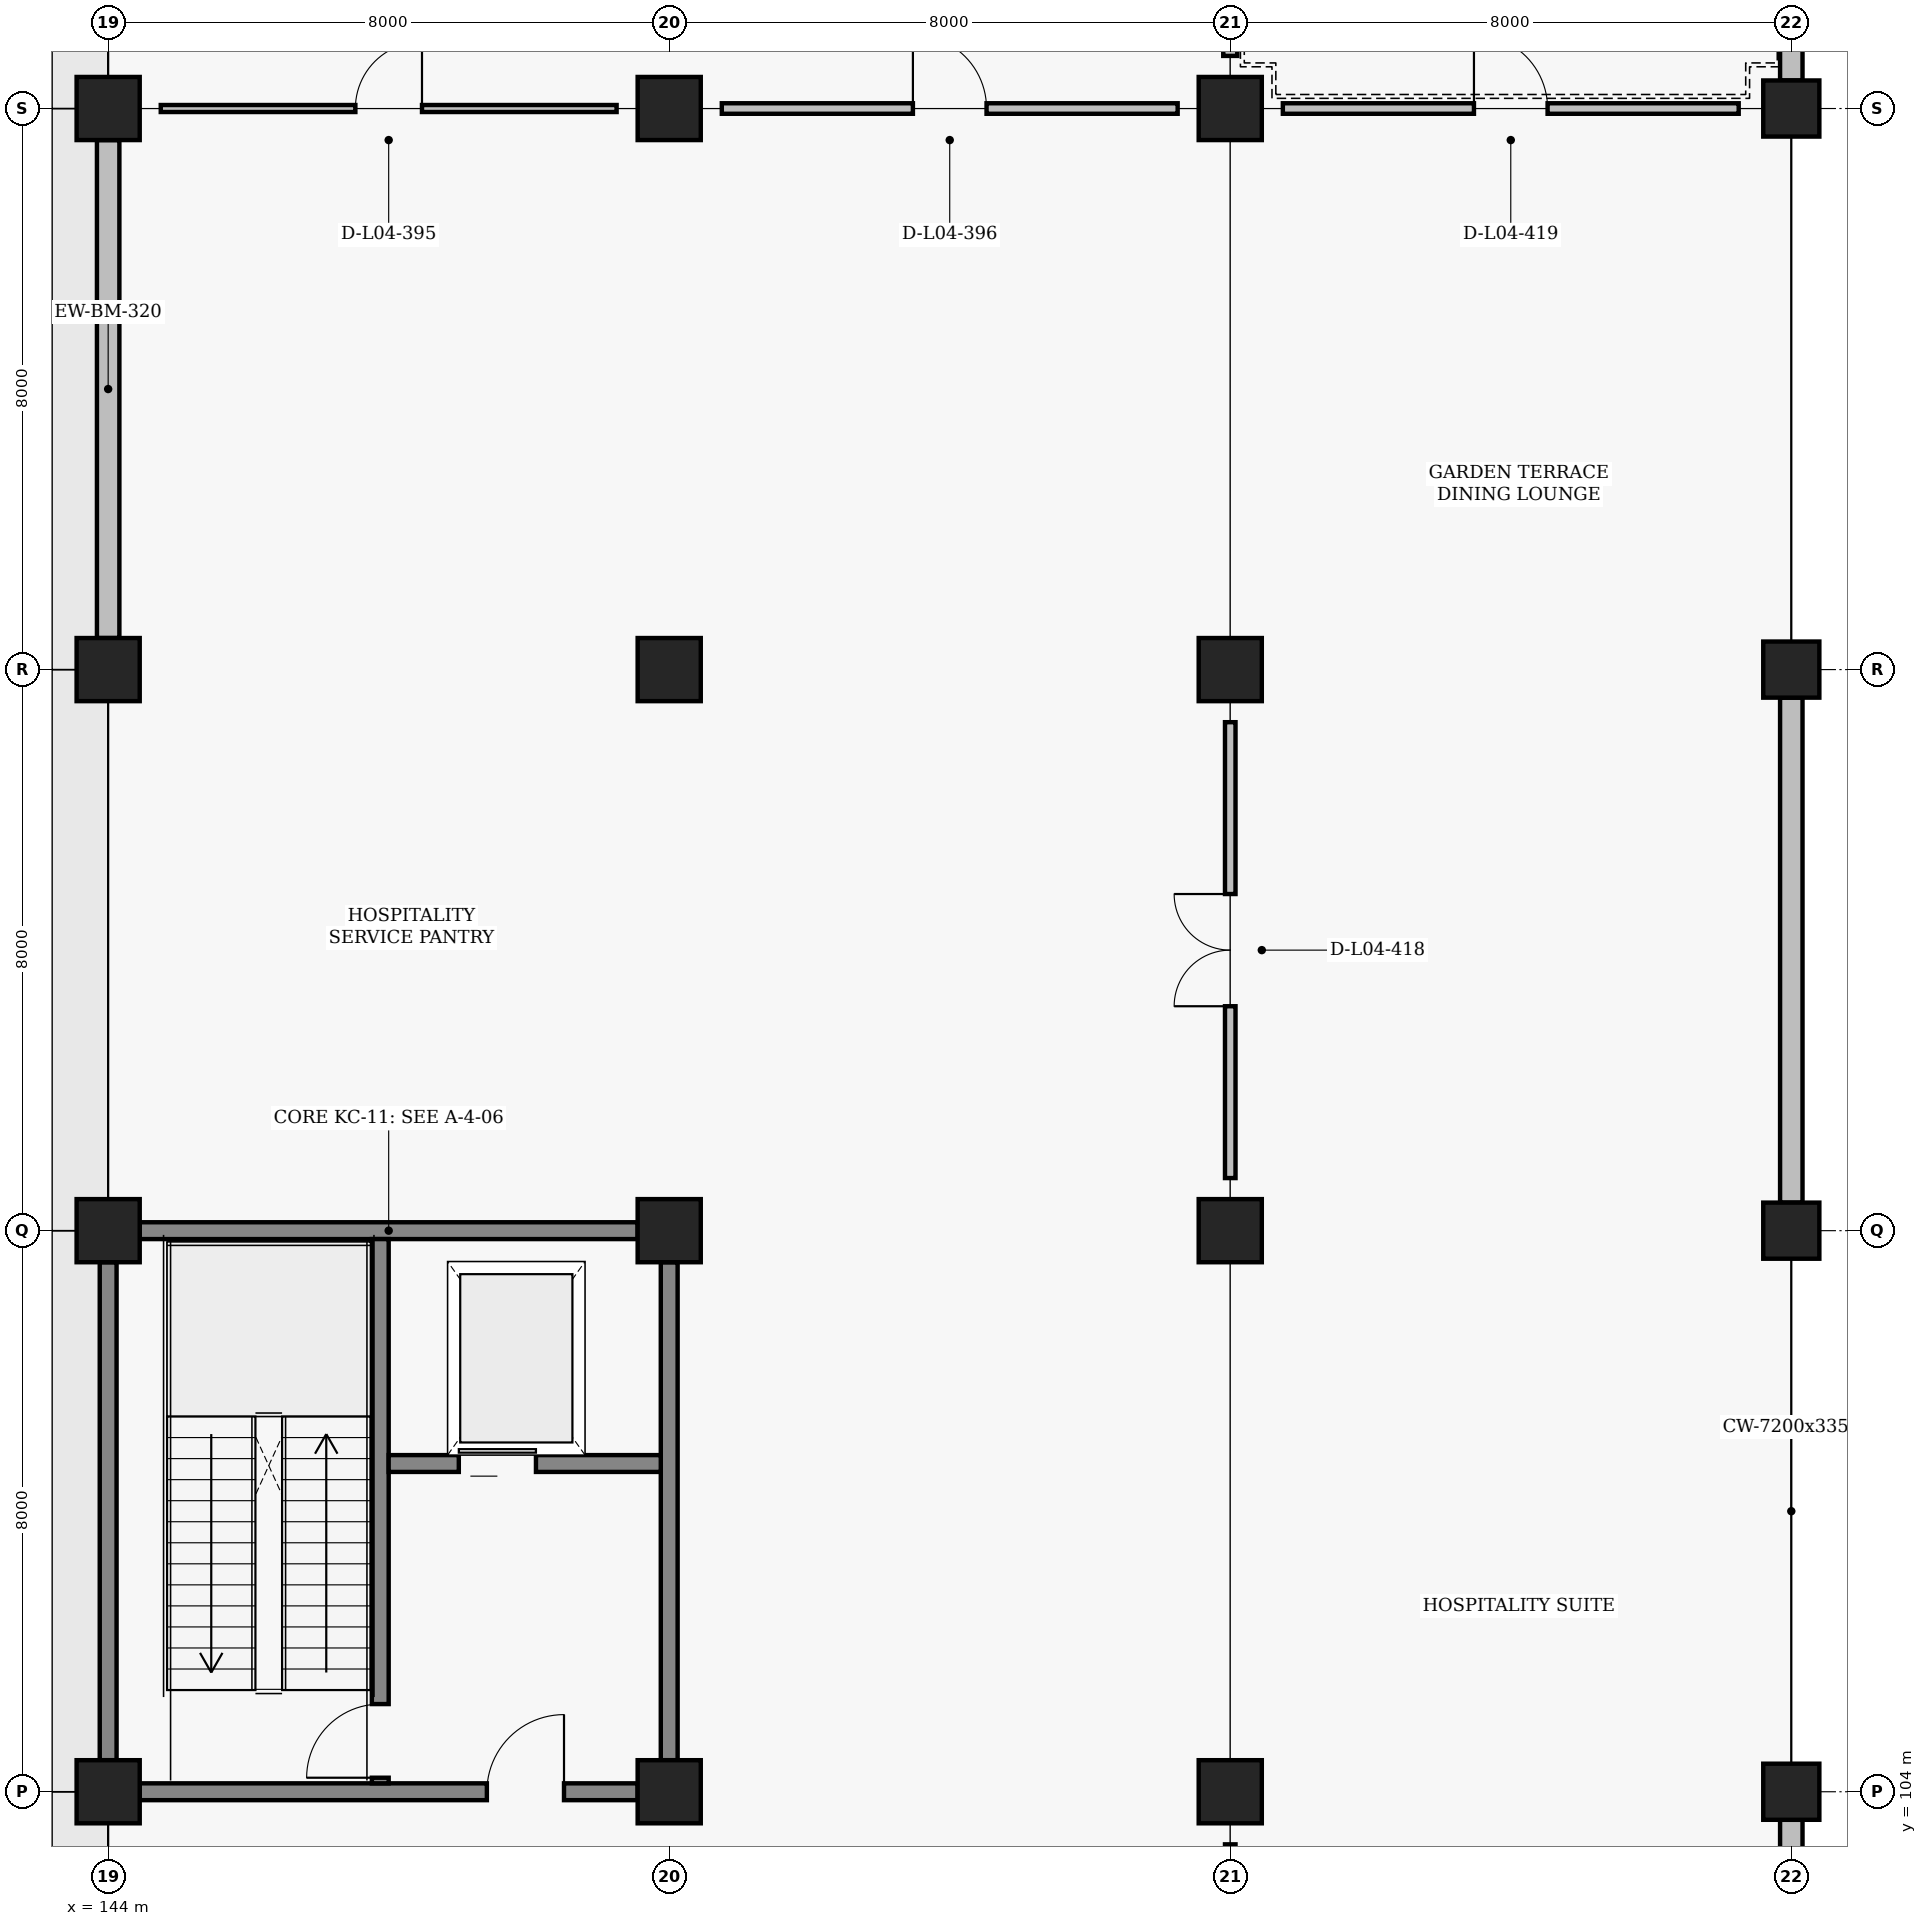
"""IFC4 building model, lengths in metres.
Left out: names, types, materials, properties, quantities, classifications, styles, units other than length and angle.
Written with IfcOpenShell. Run it as: python <this file> out.ifc"""

import sys

from ifc_helpers import new_model, si_unit, direction, frame, frame_2d, origin, origin_2d, place, context, subcontext, project, spatial, rectangle, extrude, element, fill, save


model = new_model("IFC4")
c1 = context("Model", 3, precision=1e-05, world=origin(), true_north=direction((0.0, 1.0)))
c2 = subcontext(c1, "Body", "Model", "MODEL_VIEW")
j1 = project(units=[si_unit("LENGTHUNIT", "METRE"), si_unit("PLANEANGLEUNIT", "RADIAN")], contexts=[c1])
p1 = place(None, origin())
s1 = spatial("IfcSite", under=j1, at=p1, CompositionType="ELEMENT")
p2 = place(p1, origin())
s2 = spatial("IfcBuilding", under=s1, at=p2, CompositionType="ELEMENT")
p3 = place(p2, frame((0.0, 0.0, 14.4)))
s3 = spatial("IfcBuildingStorey", under=s2, at=p3, CompositionType="ELEMENT", Elevation=14.4)
for number, where, z_axis, x_axis in (
    (1, (144.0, 104.0, 0.0), (0.0, 0.0, 1.0), (1.0, 0.0, 0.0)),
    (2, (144.0, 112.0, 0.0), (0.0, 0.0, 1.0), (1.0, 0.0, 0.0)),
    (3, (144.0, 120.0, 0.0), (0.0, 0.0, 1.0), (1.0, 0.0, 0.0)),
    (4, (144.0, 128.0, 0.0), (0.0, 0.0, 1.0), (1.0, 0.0, 0.0)),
    (5, (152.0, 104.0, 0.0), (0.0, 0.0, 1.0), (1.0, 0.0, 0.0)),
    (6, (152.0, 112.0, 0.0), (0.0, 0.0, 1.0), (1.0, 0.0, 0.0)),
    (7, (152.0, 120.0, 0.0), (0.0, 0.0, 1.0), (1.0, 0.0, 0.0)),
    (8, (152.0, 128.0, 0.0), (0.0, 0.0, 1.0), (1.0, 0.0, 0.0)),
    (9, (160.0, 104.0, 0.0), (0.0, 0.0, 1.0), (1.0, 0.0, 0.0)),
    (10, (160.0, 112.0, 0.0), (0.0, 0.0, 1.0), (1.0, 0.0, 0.0)),
    (11, (160.0, 120.0, 0.0), (0.0, 0.0, 1.0), (1.0, 0.0, 0.0)),
    (12, (160.0, 128.0, 0.0), (0.0, 0.0, 1.0), (1.0, 0.0, 0.0)),
):
    element("IfcColumn", number, at=place(p3, frame(where, z_axis=z_axis, x_axis=x_axis)), inside=s3, PredefinedType="COLUMN", context=c2, shape_type="SweptSolid", body=[
        extrude(rectangle(XDim=0.9, YDim=0.9, at=origin_2d()), origin(), (0.0, 0.0, 1.0), 4.2),
    ])
for number, where, z_axis, x_axis in (
    (13, (168.0, 104.0, 0.0), (0.0, 0.0, 1.0), (1.0, 0.0, 0.0)),
    (14, (168.0, 112.0, 0.0), (0.0, 0.0, 1.0), (1.0, 0.0, 0.0)),
    (15, (168.0, 120.0, 0.0), (0.0, 0.0, 1.0), (1.0, 0.0, 0.0)),
    (16, (168.0, 128.0, 0.0), (0.0, 0.0, 1.0), (1.0, 0.0, 0.0)),
):
    element("IfcColumn", number, at=place(p3, frame(where, z_axis=z_axis, x_axis=x_axis)), inside=s3, PredefinedType="COLUMN", context=c2, shape_type="SweptSolid", body=[
        extrude(rectangle(XDim=0.8, YDim=0.8, at=origin_2d()), origin(), (0.0, 0.0, 1.0), 4.2),
    ])
p4 = place(p3, frame((144.0, 120.45, 0.0), z_axis=(0.0, 0.0, 1.0), x_axis=(0.0, 1.0, 0.0)))
e17 = element("IfcWall", 17, at=p4, inside=s3, PredefinedType="SOLIDWALL", context=c2, shape_type="SweptSolid", body=[
    extrude(rectangle(XDim=7.1, YDim=0.32, at=frame_2d((3.55, 0.0))), origin(), (0.0, 0.0, 1.0), 3.1),
])
for number, where, z_axis, x_axis in (
    (18, (168.0, 96.4, 0.0), (0.0, 0.0, 1.0), (0.0, 1.0, 0.0)),
    (19, (168.0, 112.4, 0.0), (0.0, 0.0, 1.0), (0.0, 1.0, 0.0)),
    (20, (168.0, 128.4, 0.0), (0.0, 0.0, 1.0), (0.0, 1.0, 0.0)),
):
    element("IfcWall", number, at=place(p3, frame(where, z_axis=z_axis, x_axis=x_axis)), inside=s3, PredefinedType="SOLIDWALL", context=c2, shape_type="SweptSolid", body=[
        extrude(rectangle(XDim=7.2, YDim=0.32, at=frame_2d((3.6, 0.0))), origin(), (0.0, 0.0, 1.0), 3.35),
    ])
p5 = place(p3, frame((144.45, 104.0, 0.0), z_axis=(0.0, 0.0, 1.0), x_axis=(1.0, 0.0, 0.0)))
e21 = element("IfcWall", 21, at=p5, inside=s3, PredefinedType="SHEAR", context=c2, shape_type="SweptSolid", body=[
    extrude(rectangle(XDim=7.1, YDim=0.24, at=frame_2d((3.55, 0.0))), origin(), (0.0, 0.0, 1.0), 3.33),
])
p6 = place(p5, frame((4.95, 0.0, 0.0)))
e22 = element("IfcOpeningElement", 22, at=p6, cuts=e21, PredefinedType="OPENING", context=c2, shape_type="SweptSolid", body=[
    extrude(rectangle(XDim=1.1, YDim=2.2, at=frame_2d((0.55, 1.1))), frame((0.0, 0.13, 0.0), z_axis=(0.0, -1.0, 0.0), x_axis=(1.0, 0.0, 0.0)), (0.0, 0.0, 1.0), 0.26),
])
p7 = place(p3, frame((144.45, 112.0, 0.0), z_axis=(0.0, 0.0, 1.0), x_axis=(1.0, 0.0, 0.0)))
e23 = element("IfcWall", 23, at=p7, inside=s3, PredefinedType="SHEAR", context=c2, shape_type="SweptSolid", body=[
    extrude(rectangle(XDim=7.1, YDim=0.24, at=frame_2d((3.55, 0.0))), origin(), (0.0, 0.0, 1.0), 3.33),
])
p8 = place(p3, frame((144.0, 104.45, 0.0), z_axis=(0.0, 0.0, 1.0), x_axis=(0.0, 1.0, 0.0)))
e24 = element("IfcWall", 24, at=p8, inside=s3, PredefinedType="SHEAR", context=c2, shape_type="SweptSolid", body=[
    extrude(rectangle(XDim=7.1, YDim=0.24, at=frame_2d((3.55, 0.0))), origin(), (0.0, 0.0, 1.0), 3.1),
])
p9 = place(p3, frame((152.0, 104.45, 0.0), z_axis=(0.0, 0.0, 1.0), x_axis=(0.0, 1.0, 0.0)))
e25 = element("IfcWall", 25, at=p9, inside=s3, PredefinedType="SHEAR", context=c2, shape_type="SweptSolid", body=[
    extrude(rectangle(XDim=7.1, YDim=0.24, at=frame_2d((3.55, 0.0))), origin(), (0.0, 0.0, 1.0), 3.33),
])
p10 = place(p3, frame((147.88, 104.12, 0.0), z_axis=(0.0, 0.0, 1.0), x_axis=(0.0, 1.0, 0.0)))
e26 = element("IfcWall", 26, at=p10, inside=s3, PredefinedType="SHEAR", context=c2, shape_type="SweptSolid", body=[
    extrude(rectangle(XDim=7.76, YDim=0.24, at=frame_2d((3.88, 0.0))), origin(), (0.0, 0.0, 1.0), 3.43),
])
p11 = place(p10, frame((0.08, 0.0, 0.0)))
e27 = element("IfcOpeningElement", 27, at=p11, cuts=e26, PredefinedType="OPENING", context=c2, shape_type="SweptSolid", body=[
    extrude(rectangle(XDim=1.05, YDim=2.15, at=frame_2d((0.525, 1.075))), frame((0.0, 0.13, 0.0), z_axis=(0.0, -1.0, 0.0), x_axis=(1.0, 0.0, 0.0)), (0.0, 0.0, 1.0), 0.26),
])
p12 = place(p3, frame((148.0, 108.68, 0.0), z_axis=(0.0, 0.0, 1.0), x_axis=(1.0, 0.0, 0.0)))
e28 = element("IfcWall", 28, at=p12, inside=s3, PredefinedType="SHEAR", context=c2, shape_type="SweptSolid", body=[
    extrude(rectangle(XDim=3.88, YDim=0.24, at=frame_2d((1.94, 0.0))), origin(), (0.0, 0.0, 1.0), 3.33),
])
p13 = place(p12, frame((1.0, 0.0, 0.0)))
e29 = element("IfcOpeningElement", 29, at=p13, cuts=e28, PredefinedType="OPENING", context=c2, shape_type="SweptSolid", body=[
    extrude(rectangle(XDim=1.1, YDim=2.15, at=frame_2d((0.55, 1.075))), frame((0.0, 0.13, 0.0), z_axis=(0.0, -1.0, 0.0), x_axis=(1.0, 0.0, 0.0)), (0.0, 0.0, 1.0), 0.26),
])
p14 = place(p3, frame((160.0, 128.75, 0.0), z_axis=(0.0, 0.0, 1.0), x_axis=(0.0, 1.0, 0.0)))
e30 = element("IfcWall", 30, at=p14, inside=s3, PredefinedType="PARTITIONING", context=c2, shape_type="SweptSolid", body=[
    extrude(rectangle(XDim=6.5, YDim=0.2, at=frame_2d((3.25, 0.0))), origin(), (0.0, 0.0, 1.0), 3.33),
])
p15 = place(p3, frame((160.0, 96.75, 0.0), z_axis=(0.0, 0.0, 1.0), x_axis=(0.0, 1.0, 0.0)))
e31 = element("IfcWall", 31, at=p15, inside=s3, PredefinedType="PARTITIONING", context=c2, shape_type="SweptSolid", body=[
    extrude(rectangle(XDim=6.5, YDim=0.15, at=frame_2d((3.25, 0.0))), origin(), (0.0, 0.0, 1.0), 3.33),
])
p16 = place(p15, frame((2.45, 0.0, 0.0)))
e32 = element("IfcOpeningElement", 32, at=p16, cuts=e31, PredefinedType="OPENING", context=c2, shape_type="SweptSolid", body=[
    extrude(rectangle(XDim=1.6, YDim=2.2, at=frame_2d((0.8, 1.1))), frame((0.0, 0.085, 0.0), z_axis=(0.0, -1.0, 0.0), x_axis=(1.0, 0.0, 0.0)), (0.0, 0.0, 1.0), 0.17),
])
p17 = place(p3, frame((144.75, 128.0, 0.0), z_axis=(0.0, 0.0, 1.0), x_axis=(1.0, 0.0, 0.0)))
e33 = element("IfcWall", 33, at=p17, inside=s3, PredefinedType="PARTITIONING", context=c2, shape_type="SweptSolid", body=[
    extrude(rectangle(XDim=6.5, YDim=0.1, at=frame_2d((3.25, 0.0))), origin(), (0.0, 0.0, 1.0), 3.43),
])
p18 = place(p17, frame((2.775, 0.0, 0.0)))
e34 = element("IfcOpeningElement", 34, at=p18, cuts=e33, PredefinedType="OPENING", context=c2, shape_type="SweptSolid", body=[
    extrude(rectangle(XDim=0.95, YDim=2.1, at=frame_2d((0.475, 1.05))), frame((0.0, 0.06, 0.0), z_axis=(0.0, -1.0, 0.0), x_axis=(1.0, 0.0, 0.0)), (0.0, 0.0, 1.0), 0.12),
])
p19 = place(p3, frame((152.75, 128.0, 0.0), z_axis=(0.0, 0.0, 1.0), x_axis=(1.0, 0.0, 0.0)))
e35 = element("IfcWall", 35, at=p19, inside=s3, PredefinedType="PARTITIONING", context=c2, shape_type="SweptSolid", body=[
    extrude(rectangle(XDim=6.5, YDim=0.15, at=frame_2d((3.25, 0.0))), origin(), (0.0, 0.0, 1.0), 3.43),
])
p20 = place(p19, frame((2.725, 0.0, 0.0)))
e36 = element("IfcOpeningElement", 36, at=p20, cuts=e35, PredefinedType="OPENING", context=c2, shape_type="SweptSolid", body=[
    extrude(rectangle(XDim=1.05, YDim=2.15, at=frame_2d((0.525, 1.075))), frame((0.0, 0.085, 0.0), z_axis=(0.0, -1.0, 0.0), x_axis=(1.0, 0.0, 0.0)), (0.0, 0.0, 1.0), 0.17),
])
p21 = place(p3, frame((160.0, 112.75, 0.0), z_axis=(0.0, 0.0, 1.0), x_axis=(0.0, 1.0, 0.0)))
e37 = element("IfcWall", 37, at=p21, inside=s3, PredefinedType="PARTITIONING", context=c2, shape_type="SweptSolid", body=[
    extrude(rectangle(XDim=6.5, YDim=0.15, at=frame_2d((3.25, 0.0))), origin(), (0.0, 0.0, 1.0), 3.33),
])
p22 = place(p21, frame((2.45, 0.0, 0.0)))
e38 = element("IfcOpeningElement", 38, at=p22, cuts=e37, PredefinedType="OPENING", context=c2, shape_type="SweptSolid", body=[
    extrude(rectangle(XDim=1.6, YDim=2.2, at=frame_2d((0.8, 1.1))), frame((0.0, 0.085, 0.0), z_axis=(0.0, -1.0, 0.0), x_axis=(1.0, 0.0, 0.0)), (0.0, 0.0, 1.0), 0.17),
])
p23 = place(p3, frame((160.75, 128.0, 0.0), z_axis=(0.0, 0.0, 1.0), x_axis=(1.0, 0.0, 0.0)))
e39 = element("IfcWall", 39, at=p23, inside=s3, PredefinedType="PARTITIONING", context=c2, shape_type="SweptSolid", body=[
    extrude(rectangle(XDim=6.5, YDim=0.15, at=frame_2d((3.25, 0.0))), origin(), (0.0, 0.0, 1.0), 3.47),
])
p24 = place(p23, frame((2.725, 0.0, 0.0)))
e40 = element("IfcOpeningElement", 40, at=p24, cuts=e39, PredefinedType="OPENING", context=c2, shape_type="SweptSolid", body=[
    extrude(rectangle(XDim=1.05, YDim=2.15, at=frame_2d((0.525, 1.075))), frame((0.0, 0.085, 0.0), z_axis=(0.0, -1.0, 0.0), x_axis=(1.0, 0.0, 0.0)), (0.0, 0.0, 1.0), 0.17),
])
p25 = place(p6, origin())
e41 = element("IfcDoor", 41, at=p25, inside=s3, OperationType="SINGLE_SWING_RIGHT", PredefinedType="DOOR", context=c2, shape_type="SweptSolid", body=[
    extrude(rectangle(XDim=1.1, YDim=2.2, at=frame_2d((0.55, 1.1))), frame((0.0, 0.025, 0.0), z_axis=(0.0, -1.0, 0.0), x_axis=(1.0, 0.0, 0.0)), (0.0, 0.0, 1.0), 0.05),
])
fill(e22, e41)
p26 = place(p11, origin())
e42 = element("IfcDoor", 42, at=p26, inside=s3, OperationType="SINGLE_SWING_LEFT", PredefinedType="DOOR", context=c2, shape_type="SweptSolid", body=[
    extrude(rectangle(XDim=1.05, YDim=2.15, at=frame_2d((0.525, 1.075))), frame((0.0, 0.025, 0.0), z_axis=(0.0, -1.0, 0.0), x_axis=(1.0, 0.0, 0.0)), (0.0, 0.0, 1.0), 0.05),
])
fill(e27, e42)
p27 = place(p13, origin())
e43 = element("IfcDoor", 43, at=p27, inside=s3, OperationType="SLIDING_TO_LEFT", PredefinedType="DOOR", context=c2, shape_type="SweptSolid", body=[
    extrude(rectangle(XDim=1.1, YDim=2.15, at=frame_2d((0.55, 1.075))), frame((0.0, 0.025, 0.0), z_axis=(0.0, -1.0, 0.0), x_axis=(1.0, 0.0, 0.0)), (0.0, 0.0, 1.0), 0.05),
])
fill(e29, e43)
p28 = place(p18, origin())
e44 = element("IfcDoor", 44, at=p28, inside=s3, OperationType="SINGLE_SWING_RIGHT", PredefinedType="DOOR", context=c2, shape_type="SweptSolid", body=[
    extrude(rectangle(XDim=0.95, YDim=2.1, at=frame_2d((0.475, 1.05))), frame((0.0, 0.025, 0.0), z_axis=(0.0, -1.0, 0.0), x_axis=(1.0, 0.0, 0.0)), (0.0, 0.0, 1.0), 0.05),
])
fill(e34, e44)
p29 = place(p20, origin())
e45 = element("IfcDoor", 45, at=p29, inside=s3, OperationType="SINGLE_SWING_LEFT", PredefinedType="DOOR", context=c2, shape_type="SweptSolid", body=[
    extrude(rectangle(XDim=1.05, YDim=2.15, at=frame_2d((0.525, 1.075))), frame((0.0, 0.025, 0.0), z_axis=(0.0, -1.0, 0.0), x_axis=(1.0, 0.0, 0.0)), (0.0, 0.0, 1.0), 0.05),
])
fill(e36, e45)
p30 = place(p22, origin())
e46 = element("IfcDoor", 46, at=p30, inside=s3, OperationType="DOUBLE_SWING_LEFT", PredefinedType="DOOR", context=c2, shape_type="SweptSolid", body=[
    extrude(rectangle(XDim=1.6, YDim=2.2, at=frame_2d((0.8, 1.1))), frame((0.0, 0.025, 0.0), z_axis=(0.0, -1.0, 0.0), x_axis=(1.0, 0.0, 0.0)), (0.0, 0.0, 1.0), 0.05),
])
fill(e38, e46)
p31 = place(p24, origin())
e47 = element("IfcDoor", 47, at=p31, inside=s3, OperationType="SINGLE_SWING_LEFT", PredefinedType="DOOR", context=c2, shape_type="SweptSolid", body=[
    extrude(rectangle(XDim=1.05, YDim=2.15, at=frame_2d((0.525, 1.075))), frame((0.0, 0.025, 0.0), z_axis=(0.0, -1.0, 0.0), x_axis=(1.0, 0.0, 0.0)), (0.0, 0.0, 1.0), 0.05),
])
fill(e40, e47)
save(model, sys.argv[1])
